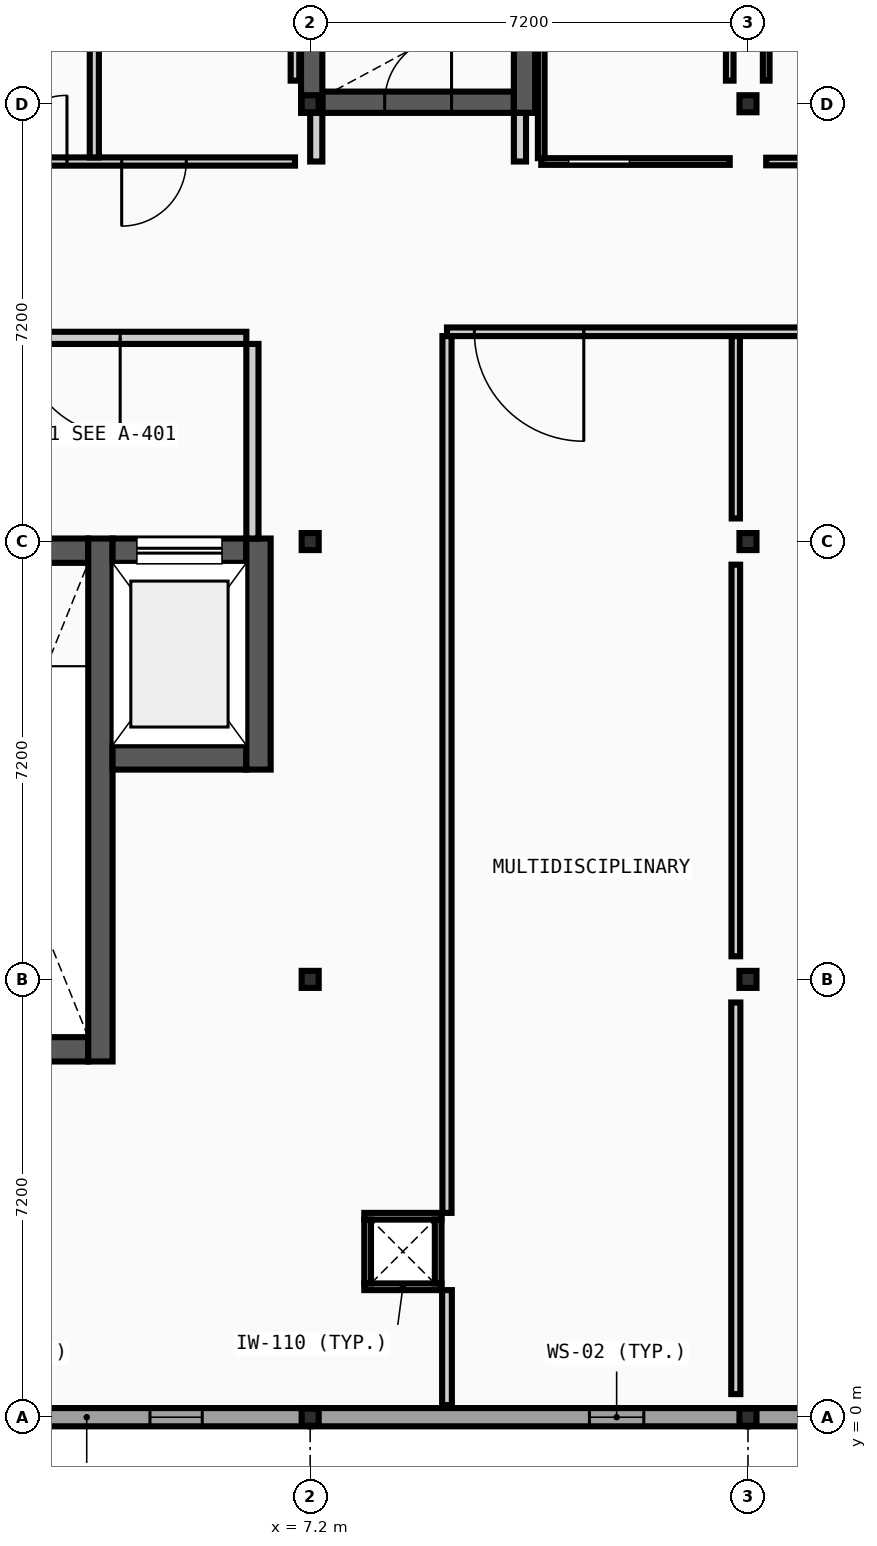
"""IFC4 building model, lengths in metres.
Left out: names, types, materials, properties, quantities, classifications, styles, units other than length and angle.
Written with IfcOpenShell. Run it as: python <this file> out.ifc"""

import sys

from ifc_helpers import new_model, si_unit, direction, frame, frame_2d, origin, origin_2d, place, context, subcontext, project, spatial, rectangle, i_section, extrude, element, fill, save


model = new_model("IFC4")
c1 = context("Model", 3, precision=1e-05, world=origin(), true_north=direction((0.0, 1.0)))
c2 = subcontext(c1, "Body", "Model", "MODEL_VIEW")
j1 = project(units=[si_unit("LENGTHUNIT", "METRE"), si_unit("PLANEANGLEUNIT", "RADIAN")], contexts=[c1])
p1 = place(None, origin())
s1 = spatial("IfcSite", under=j1, at=p1, CompositionType="ELEMENT")
p2 = place(p1, origin())
s2 = spatial("IfcBuilding", under=s1, at=p2, CompositionType="ELEMENT")
p3 = place(p2, frame((0.0, 0.0, 27.2)))
s3 = spatial("IfcBuildingStorey", under=s2, at=p3, CompositionType="ELEMENT", Elevation=27.2)
for number, where, z_axis, x_axis in (
    (1, (7.2, 0.0, 0.0), (0.0, 0.0, 1.0), (1.0, 0.0, 0.0)),
    (2, (7.2, 7.2, 0.0), (0.0, 0.0, 1.0), (1.0, 0.0, 0.0)),
    (3, (7.2, 14.4, 0.0), (0.0, 0.0, 1.0), (1.0, 0.0, 0.0)),
    (4, (7.2, 21.6, 0.0), (0.0, 0.0, 1.0), (1.0, 0.0, 0.0)),
    (5, (14.4, 0.0, 0.0), (0.0, 0.0, 1.0), (1.0, 0.0, 0.0)),
    (6, (14.4, 7.2, 0.0), (0.0, 0.0, 1.0), (1.0, 0.0, 0.0)),
    (7, (14.4, 14.4, 0.0), (0.0, 0.0, 1.0), (1.0, 0.0, 0.0)),
    (8, (14.4, 21.6, 0.0), (0.0, 0.0, 1.0), (1.0, 0.0, 0.0)),
):
    element("IfcColumn", number, at=place(p3, frame(where, z_axis=z_axis, x_axis=x_axis)), inside=s3, PredefinedType="COLUMN", context=c2, shape_type="SweptSolid", body=[
        extrude(i_section(OverallWidth=0.28, OverallDepth=0.28, WebThickness=0.01, FlangeThickness=0.018, FilletRadius=0.024, at=origin_2d()), origin(), (0.0, 0.0, 1.0), 4.4),
    ])
p4 = place(p3, frame((-0.15, 0.0, 0.0), z_axis=(0.0, 0.0, 1.0), x_axis=(1.0, 0.0, 0.0)))
e9 = element("IfcWall", 9, at=p4, inside=s3, PredefinedType="STANDARD", context=c2, shape_type="SweptSolid", body=[
    extrude(rectangle(XDim=7.35, YDim=0.3, at=frame_2d((3.675, 0.0))), origin(), (0.0, 0.0, 1.0), 4.035),
])
p5 = place(p4, frame((1.775, 0.0, 0.95)))
e10 = element("IfcOpeningElement", 10, at=p5, cuts=e9, PredefinedType="OPENING", context=c2, shape_type="SweptSolid", body=[
    extrude(rectangle(XDim=0.86, YDim=1.26, at=frame_2d((0.43, 0.63))), frame((0.0, 0.16, 0.0), z_axis=(0.0, -1.0, 0.0), x_axis=(1.0, 0.0, 0.0)), (0.0, 0.0, 1.0), 0.32),
])
p6 = place(p4, frame((4.715, 0.0, 0.95)))
e11 = element("IfcOpeningElement", 11, at=p6, cuts=e9, PredefinedType="OPENING", context=c2, shape_type="SweptSolid", body=[
    extrude(rectangle(XDim=0.86, YDim=1.26, at=frame_2d((0.43, 0.63))), frame((0.0, 0.16, 0.0), z_axis=(0.0, -1.0, 0.0), x_axis=(1.0, 0.0, 0.0)), (0.0, 0.0, 1.0), 0.32),
])
p7 = place(p3, frame((7.2, 0.0, 0.0), z_axis=(0.0, 0.0, 1.0), x_axis=(1.0, 0.0, 0.0)))
e12 = element("IfcWall", 12, at=p7, inside=s3, PredefinedType="STANDARD", context=c2, shape_type="SweptSolid", body=[
    extrude(rectangle(XDim=7.2, YDim=0.3, at=frame_2d((3.6, 0.0))), origin(), (0.0, 0.0, 1.0), 4.035),
])
p8 = place(p7, frame((4.593, 0.0, 0.95)))
e13 = element("IfcOpeningElement", 13, at=p8, cuts=e12, PredefinedType="OPENING", context=c2, shape_type="SweptSolid", body=[
    extrude(rectangle(XDim=0.894, YDim=1.26, at=frame_2d((0.447, 0.63))), frame((0.0, 0.16, 0.0), z_axis=(0.0, -1.0, 0.0), x_axis=(1.0, 0.0, 0.0)), (0.0, 0.0, 1.0), 0.32),
])
p9 = place(p3, frame((14.4, 0.0, 0.0), z_axis=(0.0, 0.0, 1.0), x_axis=(1.0, 0.0, 0.0)))
e14 = element("IfcWall", 14, at=p9, inside=s3, PredefinedType="STANDARD", context=c2, shape_type="SweptSolid", body=[
    extrude(rectangle(XDim=7.2, YDim=0.3, at=frame_2d((3.6, 0.0))), origin(), (0.0, 0.0, 1.0), 4.035),
])
p10 = place(p9, frame((1.696, 0.0, 0.95)))
e15 = element("IfcOpeningElement", 15, at=p10, cuts=e14, PredefinedType="OPENING", context=c2, shape_type="SweptSolid", body=[
    extrude(rectangle(XDim=0.928, YDim=1.26, at=frame_2d((0.464, 0.63))), frame((0.0, 0.16, 0.0), z_axis=(0.0, -1.0, 0.0), x_axis=(1.0, 0.0, 0.0)), (0.0, 0.0, 1.0), 0.32),
])
p11 = place(p9, frame((4.576, 0.0, 0.95)))
e16 = element("IfcOpeningElement", 16, at=p11, cuts=e14, PredefinedType="OPENING", context=c2, shape_type="SweptSolid", body=[
    extrude(rectangle(XDim=0.928, YDim=1.26, at=frame_2d((0.464, 0.63))), frame((0.0, 0.16, 0.0), z_axis=(0.0, -1.0, 0.0), x_axis=(1.0, 0.0, 0.0)), (0.0, 0.0, 1.0), 0.32),
])
p12 = place(p3, frame((0.4, 6.05, 0.0), z_axis=(0.0, 0.0, 1.0), x_axis=(1.0, 0.0, 0.0)))
e17 = element("IfcWall", 17, at=p12, inside=s3, PredefinedType="SHEAR", context=c2, shape_type="SweptSolid", body=[
    extrude(rectangle(XDim=3.15, YDim=0.4, at=frame_2d((1.575, 0.0))), origin(), (0.0, 0.0, 1.0), 4.18),
])
p13 = place(p3, frame((0.4, 14.25, 0.0), z_axis=(0.0, 0.0, 1.0), x_axis=(1.0, 0.0, 0.0)))
e18 = element("IfcWall", 18, at=p13, inside=s3, PredefinedType="SHEAR", context=c2, shape_type="SweptSolid", body=[
    extrude(rectangle(XDim=3.15, YDim=0.4, at=frame_2d((1.575, 0.0))), origin(), (0.0, 0.0, 1.0), 4.18),
])
p14 = place(p13, frame((0.975, 0.0, 0.0)))
e19 = element("IfcOpeningElement", 19, at=p14, cuts=e18, PredefinedType="OPENING", context=c2, shape_type="SweptSolid", body=[
    extrude(rectangle(XDim=1.2, YDim=2.15, at=frame_2d((0.6, 1.075))), frame((0.0, 0.21, 0.0), z_axis=(0.0, -1.0, 0.0), x_axis=(1.0, 0.0, 0.0)), (0.0, 0.0, 1.0), 0.42),
])
p15 = place(p3, frame((3.75, 5.85, 0.0), z_axis=(0.0, 0.0, 1.0), x_axis=(0.0, 1.0, 0.0)))
e20 = element("IfcWall", 20, at=p15, inside=s3, PredefinedType="SHEAR", context=c2, shape_type="SweptSolid", body=[
    extrude(rectangle(XDim=8.6, YDim=0.4, at=frame_2d((4.3, 0.0))), origin(), (0.0, 0.0, 1.0), 4.18),
])
p16 = place(p3, frame((3.95, 10.85, 0.0), z_axis=(0.0, 0.0, 1.0), x_axis=(1.0, 0.0, 0.0)))
e21 = element("IfcWall", 21, at=p16, inside=s3, PredefinedType="SHEAR", context=c2, shape_type="SweptSolid", body=[
    extrude(rectangle(XDim=2.2, YDim=0.4, at=frame_2d((1.1, 0.0))), origin(), (0.0, 0.0, 1.0), 4.18),
])
p17 = place(p3, frame((3.95, 14.25, 0.0), z_axis=(0.0, 0.0, 1.0), x_axis=(1.0, 0.0, 0.0)))
e22 = element("IfcWall", 22, at=p17, inside=s3, PredefinedType="SHEAR", context=c2, shape_type="SweptSolid", body=[
    extrude(rectangle(XDim=2.2, YDim=0.4, at=frame_2d((1.1, 0.0))), origin(), (0.0, 0.0, 1.0), 4.18),
])
p18 = place(p17, frame((0.4, 0.0, 0.0)))
e23 = element("IfcOpeningElement", 23, at=p18, cuts=e22, PredefinedType="OPENING", context=c2, shape_type="SweptSolid", body=[
    extrude(rectangle(XDim=1.4, YDim=2.2, at=frame_2d((0.7, 1.1))), frame((0.0, 0.21, 0.0), z_axis=(0.0, -1.0, 0.0), x_axis=(1.0, 0.0, 0.0)), (0.0, 0.0, 1.0), 0.42),
])
p19 = place(p3, frame((6.35, 10.65, 0.0), z_axis=(0.0, 0.0, 1.0), x_axis=(0.0, 1.0, 0.0)))
e24 = element("IfcWall", 24, at=p19, inside=s3, PredefinedType="SHEAR", context=c2, shape_type="SweptSolid", body=[
    extrude(rectangle(XDim=3.8, YDim=0.4, at=frame_2d((1.9, 0.0))), origin(), (0.0, 0.0, 1.0), 4.18),
])
p20 = place(p3, frame((0.4, 17.75, 0.0), z_axis=(0.0, 0.0, 1.0), x_axis=(1.0, 0.0, 0.0)))
e25 = element("IfcWall", 25, at=p20, inside=s3, PredefinedType="PARTITIONING", context=c2, shape_type="SweptSolid", body=[
    extrude(rectangle(XDim=5.75, YDim=0.2, at=frame_2d((2.875, 0.0))), origin(), (0.0, 0.0, 1.0), 4.18),
])
p21 = place(p20, frame((2.075, 0.0, 0.0)))
e26 = element("IfcOpeningElement", 26, at=p21, cuts=e25, PredefinedType="OPENING", context=c2, shape_type="SweptSolid", body=[
    extrude(rectangle(XDim=1.6, YDim=2.2, at=frame_2d((0.8, 1.1))), frame((0.0, 0.11, 0.0), z_axis=(0.0, -1.0, 0.0), x_axis=(1.0, 0.0, 0.0)), (0.0, 0.0, 1.0), 0.22),
])
p22 = place(p3, frame((6.25, 14.45, 0.0), z_axis=(0.0, 0.0, 1.0), x_axis=(0.0, 1.0, 0.0)))
e27 = element("IfcWall", 27, at=p22, inside=s3, PredefinedType="PARTITIONING", context=c2, shape_type="SweptSolid", body=[
    extrude(rectangle(XDim=3.2, YDim=0.2, at=frame_2d((1.6, 0.0))), origin(), (0.0, 0.0, 1.0), 4.18),
])
p23 = place(p3, frame((7.4, 21.625, 0.0), z_axis=(0.0, 0.0, 1.0), x_axis=(1.0, 0.0, 0.0)))
e28 = element("IfcWall", 28, at=p23, inside=s3, PredefinedType="SHEAR", context=c2, shape_type="SweptSolid", body=[
    extrude(rectangle(XDim=3.15, YDim=0.35, at=frame_2d((1.575, 0.0))), origin(), (0.0, 0.0, 1.0), 4.2),
])
p24 = place(p23, frame((1.025, 0.0, 0.0)))
e29 = element("IfcOpeningElement", 29, at=p24, cuts=e28, PredefinedType="OPENING", context=c2, shape_type="SweptSolid", body=[
    extrude(rectangle(XDim=1.1, YDim=2.15, at=frame_2d((0.55, 1.075))), frame((0.0, 0.185, 0.0), z_axis=(0.0, -1.0, 0.0), x_axis=(1.0, 0.0, 0.0)), (0.0, 0.0, 1.0), 0.37),
])
for number, where, z_axis, x_axis in (
    (30, (7.225, 21.45, 0.0), (0.0, 0.0, 1.0), (0.0, 1.0, 0.0)),
    (31, (10.725, 21.45, 0.0), (0.0, 0.0, 1.0), (0.0, 1.0, 0.0)),
):
    element("IfcWall", number, at=place(p3, frame(where, z_axis=z_axis, x_axis=x_axis)), inside=s3, PredefinedType="SHEAR", context=c2, shape_type="SweptSolid", body=[
        extrude(rectangle(XDim=7.5, YDim=0.35, at=frame_2d((3.75, 0.0))), origin(), (0.0, 0.0, 1.0), 4.2),
    ])
for number, where, z_axis, x_axis in (
    (32, (7.3, 20.65, 0.0), (0.0, 0.0, 1.0), (0.0, 1.0, 0.0)),
    (33, (10.65, 20.65, 0.0), (0.0, 0.0, 1.0), (0.0, 1.0, 0.0)),
):
    element("IfcWall", number, at=place(p3, frame(where, z_axis=z_axis, x_axis=x_axis)), inside=s3, PredefinedType="PARTITIONING", context=c2, shape_type="SweptSolid", body=[
        extrude(rectangle(XDim=0.8, YDim=0.2, at=frame_2d((0.4, 0.0))), origin(), (0.0, 0.0, 1.0), 3.85),
    ])
for number, where, z_axis, x_axis in (
    (34, (8.09, 2.145, 0.0), (0.0, 0.0, 1.0), (1.0, 0.0, 0.0)),
    (35, (8.09, 3.305, 0.0), (0.0, 0.0, 1.0), (1.0, 0.0, 0.0)),
):
    element("IfcWall", number, at=place(p3, frame(where, z_axis=z_axis, x_axis=x_axis)), inside=s3, PredefinedType="PARTITIONING", context=c2, shape_type="SweptSolid", body=[
        extrude(rectangle(XDim=1.27, YDim=0.11, at=frame_2d((0.635, 0.0))), origin(), (0.0, 0.0, 1.0), 4.18),
    ])
for number, where, z_axis, x_axis in (
    (36, (8.145, 2.2, 0.0), (0.0, 0.0, 1.0), (0.0, 1.0, 0.0)),
    (37, (9.305, 2.2, 0.0), (0.0, 0.0, 1.0), (0.0, 1.0, 0.0)),
):
    element("IfcWall", number, at=place(p3, frame(where, z_axis=z_axis, x_axis=x_axis)), inside=s3, PredefinedType="PARTITIONING", context=c2, shape_type="SweptSolid", body=[
        extrude(rectangle(XDim=1.05, YDim=0.11, at=frame_2d((0.525, 0.0))), origin(), (0.0, 0.0, 1.0), 4.18),
    ])
p25 = place(p3, frame((9.45, 17.85, 0.0), z_axis=(0.0, 0.0, 1.0), x_axis=(1.0, 0.0, 0.0)))
e38 = element("IfcWall", 38, at=p25, inside=s3, PredefinedType="PARTITIONING", context=c2, shape_type="SweptSolid", body=[
    extrude(rectangle(XDim=12.75, YDim=0.142, at=frame_2d((6.375, 0.0))), origin(), (0.0, 0.0, 1.0), 4.18),
])
p26 = place(p25, frame((0.45, 0.0, 0.0)))
e39 = element("IfcOpeningElement", 39, at=p26, cuts=e38, PredefinedType="OPENING", context=c2, shape_type="SweptSolid", body=[
    extrude(rectangle(XDim=1.8, YDim=2.3, at=frame_2d((0.9, 1.15))), frame((0.0, 0.081, 0.0), z_axis=(0.0, -1.0, 0.0), x_axis=(1.0, 0.0, 0.0)), (0.0, 0.0, 1.0), 0.162),
])
p27 = place(p25, frame((8.18, 0.0, 0.0)))
e40 = element("IfcOpeningElement", 40, at=p27, cuts=e38, PredefinedType="OPENING", context=c2, shape_type="SweptSolid", body=[
    extrude(rectangle(XDim=1.14, YDim=2.096, at=frame_2d((0.57, 1.048))), frame((0.0, 0.081, 0.0), z_axis=(0.0, -1.0, 0.0), x_axis=(1.0, 0.0, 0.0)), (0.0, 0.0, 1.0), 0.162),
])
p28 = place(p3, frame((0.2, 20.65, 0.0), z_axis=(0.0, 0.0, 1.0), x_axis=(1.0, 0.0, 0.0)))
e41 = element("IfcWall", 41, at=p28, inside=s3, PredefinedType="PARTITIONING", context=c2, shape_type="SweptSolid", body=[
    extrude(rectangle(XDim=6.75, YDim=0.135, at=frame_2d((3.375, 0.0))), origin(), (0.0, 0.0, 1.0), 4.18),
])
p29 = place(p28, frame((3.9, 0.0, 0.0)))
e42 = element("IfcOpeningElement", 42, at=p29, cuts=e41, PredefinedType="OPENING", context=c2, shape_type="SweptSolid", body=[
    extrude(rectangle(XDim=1.062, YDim=2.096, at=frame_2d((0.531, 1.048))), frame((0.0, 0.078, 0.0), z_axis=(0.0, -1.0, 0.0), x_axis=(1.0, 0.0, 0.0)), (0.0, 0.0, 1.0), 0.155),
])
p30 = place(p28, frame((1.912, 0.0, 0.0)))
e43 = element("IfcOpeningElement", 43, at=p30, cuts=e41, PredefinedType="OPENING", context=c2, shape_type="SweptSolid", body=[
    extrude(rectangle(XDim=1.088, YDim=2.096, at=frame_2d((0.544, 1.048))), frame((0.0, 0.078, 0.0), z_axis=(0.0, -1.0, 0.0), x_axis=(1.0, 0.0, 0.0)), (0.0, 0.0, 1.0), 0.155),
])
p31 = place(p3, frame((11.0, 20.65, 0.0), z_axis=(0.0, 0.0, 1.0), x_axis=(1.0, 0.0, 0.0)))
e44 = element("IfcWall", 44, at=p31, inside=s3, PredefinedType="PARTITIONING", context=c2, shape_type="SweptSolid", body=[
    extrude(rectangle(XDim=3.1, YDim=0.11, at=frame_2d((1.55, 0.0))), origin(), (0.0, 0.0, 1.0), 4.18),
])
p32 = place(p31, frame((0.45, 0.0, 0.0)))
e45 = element("IfcOpeningElement", 45, at=p32, cuts=e44, PredefinedType="OPENING", context=c2, shape_type="SweptSolid", body=[
    extrude(rectangle(XDim=1.0, YDim=2.1, at=frame_2d((0.5, 1.05))), frame((0.0, 0.065, 0.0), z_axis=(0.0, -1.0, 0.0), x_axis=(1.0, 0.0, 0.0)), (0.0, 0.0, 1.0), 0.13),
])
p33 = place(p3, frame((14.7, 20.65, 0.0), z_axis=(0.0, 0.0, 1.0), x_axis=(1.0, 0.0, 0.0)))
e46 = element("IfcWall", 46, at=p33, inside=s3, PredefinedType="PARTITIONING", context=c2, shape_type="SweptSolid", body=[
    extrude(rectangle(XDim=3.1, YDim=0.125, at=frame_2d((1.55, 0.0))), origin(), (0.0, 0.0, 1.0), 4.18),
])
p34 = place(p33, frame((1.75, 0.0, 0.0)))
e47 = element("IfcOpeningElement", 47, at=p34, cuts=e46, PredefinedType="OPENING", context=c2, shape_type="SweptSolid", body=[
    extrude(rectangle(XDim=0.9, YDim=2.1, at=frame_2d((0.45, 1.05))), frame((0.0, 0.073, 0.0), z_axis=(0.0, -1.0, 0.0), x_axis=(1.0, 0.0, 0.0)), (0.0, 0.0, 1.0), 0.145),
])
p35 = place(p3, frame((3.65, 20.718, 0.0), z_axis=(0.0, 0.0, 1.0), x_axis=(0.0, 1.0, 0.0)))
e48 = element("IfcWall", 48, at=p35, inside=s3, PredefinedType="PARTITIONING", context=c2, shape_type="SweptSolid", body=[
    extrude(rectangle(XDim=15.083, YDim=0.15, at=frame_2d((7.541, 0.0))), origin(), (0.0, 0.0, 1.0), 4.18),
])
p36 = place(p3, frame((6.95, 21.98, 0.0), z_axis=(0.0, 0.0, 1.0), x_axis=(0.0, 1.0, 0.0)))
e49 = element("IfcWall", 49, at=p36, inside=s3, PredefinedType="PARTITIONING", context=c2, shape_type="SweptSolid", body=[
    extrude(rectangle(XDim=6.44, YDim=0.142, at=frame_2d((3.22, 0.0))), origin(), (0.0, 0.0, 1.0), 4.18),
])
p37 = place(p3, frame((9.45, 0.2, 0.0), z_axis=(0.0, 0.0, 1.0), x_axis=(0.0, 1.0, 0.0)))
e50 = element("IfcWall", 50, at=p37, inside=s3, PredefinedType="PARTITIONING", context=c2, shape_type="SweptSolid", body=[
    extrude(rectangle(XDim=1.89, YDim=0.16, at=frame_2d((0.945, 0.0))), origin(), (0.0, 0.0, 1.0), 4.18),
])
p38 = place(p3, frame((9.45, 3.36, 0.0), z_axis=(0.0, 0.0, 1.0), x_axis=(0.0, 1.0, 0.0)))
e51 = element("IfcWall", 51, at=p38, inside=s3, PredefinedType="PARTITIONING", context=c2, shape_type="SweptSolid", body=[
    extrude(rectangle(XDim=14.419, YDim=0.15, at=frame_2d((7.209, 0.0))), origin(), (0.0, 0.0, 1.0), 4.18),
])
p39 = place(p3, frame((11.0, 20.705, 0.0), z_axis=(0.0, 0.0, 1.0), x_axis=(0.0, 1.0, 0.0)))
e52 = element("IfcWall", 52, at=p39, inside=s3, PredefinedType="PARTITIONING", context=c2, shape_type="SweptSolid", body=[
    extrude(rectangle(XDim=15.032, YDim=0.11, at=frame_2d((7.516, 0.0))), origin(), (0.0, 0.0, 1.0), 4.18),
])
p40 = place(p3, frame((14.1, 21.98, 0.0), z_axis=(0.0, 0.0, 1.0), x_axis=(0.0, 1.0, 0.0)))
e53 = element("IfcWall", 53, at=p40, inside=s3, PredefinedType="PARTITIONING", context=c2, shape_type="SweptSolid", body=[
    extrude(rectangle(XDim=6.44, YDim=0.125, at=frame_2d((3.22, 0.0))), origin(), (0.0, 0.0, 1.0), 4.18),
])
p41 = place(p3, frame((14.2, 0.38, 0.0), z_axis=(0.0, 0.0, 1.0), x_axis=(0.0, 1.0, 0.0)))
e54 = element("IfcWall", 54, at=p41, inside=s3, PredefinedType="PARTITIONING", context=c2, shape_type="SweptSolid", body=[
    extrude(rectangle(XDim=6.44, YDim=0.15, at=frame_2d((3.22, 0.0))), origin(), (0.0, 0.0, 1.0), 4.18),
])
p42 = place(p3, frame((14.2, 7.58, 0.0), z_axis=(0.0, 0.0, 1.0), x_axis=(0.0, 1.0, 0.0)))
e55 = element("IfcWall", 55, at=p42, inside=s3, PredefinedType="PARTITIONING", context=c2, shape_type="SweptSolid", body=[
    extrude(rectangle(XDim=6.44, YDim=0.142, at=frame_2d((3.22, 0.0))), origin(), (0.0, 0.0, 1.0), 4.18),
])
p43 = place(p3, frame((14.2, 14.78, 0.0), z_axis=(0.0, 0.0, 1.0), x_axis=(0.0, 1.0, 0.0)))
e56 = element("IfcWall", 56, at=p43, inside=s3, PredefinedType="PARTITIONING", context=c2, shape_type="SweptSolid", body=[
    extrude(rectangle(XDim=2.999, YDim=0.135, at=frame_2d((1.5, 0.0))), origin(), (0.0, 0.0, 1.0), 4.18),
])
p44 = place(p3, frame((14.7, 21.98, 0.0), z_axis=(0.0, 0.0, 1.0), x_axis=(0.0, 1.0, 0.0)))
e57 = element("IfcWall", 57, at=p44, inside=s3, PredefinedType="PARTITIONING", context=c2, shape_type="SweptSolid", body=[
    extrude(rectangle(XDim=6.44, YDim=0.11, at=frame_2d((3.22, 0.0))), origin(), (0.0, 0.0, 1.0), 4.18),
])
p45 = place(p6, origin())
e58 = element("IfcWindow", 58, at=p45, inside=s3, PartitioningType="SINGLE_PANEL", PredefinedType="WINDOW", context=c2, shape_type="SweptSolid", body=[
    extrude(rectangle(XDim=0.86, YDim=1.26, at=frame_2d((0.43, 0.63))), frame((0.0, 0.03, 0.0), z_axis=(0.0, -1.0, 0.0), x_axis=(1.0, 0.0, 0.0)), (0.0, 0.0, 1.0), 0.06),
])
fill(e11, e58)
p46 = place(p8, origin())
e59 = element("IfcWindow", 59, at=p46, inside=s3, PartitioningType="SINGLE_PANEL", PredefinedType="WINDOW", context=c2, shape_type="SweptSolid", body=[
    extrude(rectangle(XDim=0.894, YDim=1.26, at=frame_2d((0.447, 0.63))), frame((0.0, 0.03, 0.0), z_axis=(0.0, -1.0, 0.0), x_axis=(1.0, 0.0, 0.0)), (0.0, 0.0, 1.0), 0.06),
])
fill(e13, e59)
p47 = place(p18, origin())
e60 = element("IfcDoor", 60, at=p47, inside=s3, OperationType="SLIDING_TO_LEFT", PredefinedType="DOOR", context=c2, shape_type="SweptSolid", body=[
    extrude(rectangle(XDim=1.4, YDim=2.2, at=frame_2d((0.7, 1.1))), frame((0.0, 0.025, 0.0), z_axis=(0.0, -1.0, 0.0), x_axis=(1.0, 0.0, 0.0)), (0.0, 0.0, 1.0), 0.05),
])
fill(e23, e60)
p48 = place(p21, origin())
e61 = element("IfcDoor", 61, at=p48, inside=s3, OperationType="DOUBLE_DOOR_SINGLE_SWING", PredefinedType="DOOR", context=c2, shape_type="SweptSolid", body=[
    extrude(rectangle(XDim=1.6, YDim=2.2, at=frame_2d((0.8, 1.1))), frame((0.0, 0.025, 0.0), z_axis=(0.0, -1.0, 0.0), x_axis=(1.0, 0.0, 0.0)), (0.0, 0.0, 1.0), 0.05),
])
fill(e26, e61)
p49 = place(p24, frame((1.1, 0.0, 0.0), z_axis=(0.0, 0.0, 1.0), x_axis=(-1.0, 0.0, 0.0)))
e62 = element("IfcDoor", 62, at=p49, inside=s3, OperationType="SINGLE_SWING_RIGHT", PredefinedType="DOOR", context=c2, shape_type="SweptSolid", body=[
    extrude(rectangle(XDim=1.1, YDim=2.15, at=frame_2d((0.55, 1.075))), frame((0.0, 0.025, 0.0), z_axis=(0.0, -1.0, 0.0), x_axis=(1.0, 0.0, 0.0)), (0.0, 0.0, 1.0), 0.05),
])
fill(e29, e62)
p50 = place(p32, frame((1.0, 0.0, 0.0), z_axis=(0.0, 0.0, 1.0), x_axis=(-1.0, 0.0, 0.0)))
e63 = element("IfcDoor", 63, at=p50, inside=s3, OperationType="SLIDING_TO_LEFT", PredefinedType="DOOR", context=c2, shape_type="SweptSolid", body=[
    extrude(rectangle(XDim=1.0, YDim=2.1, at=frame_2d((0.5, 1.05))), frame((0.0, 0.025, 0.0), z_axis=(0.0, -1.0, 0.0), x_axis=(1.0, 0.0, 0.0)), (0.0, 0.0, 1.0), 0.05),
])
fill(e45, e63)
p51 = place(p29, frame((1.062, 0.0, 0.0), z_axis=(0.0, 0.0, 1.0), x_axis=(-1.0, 0.0, 0.0)))
e64 = element("IfcDoor", 64, at=p51, inside=s3, OperationType="SINGLE_SWING_LEFT", PredefinedType="DOOR", context=c2, shape_type="SweptSolid", body=[
    extrude(rectangle(XDim=1.062, YDim=2.096, at=frame_2d((0.531, 1.048))), frame((0.0, 0.025, 0.0), z_axis=(0.0, -1.0, 0.0), x_axis=(1.0, 0.0, 0.0)), (0.0, 0.0, 1.0), 0.05),
])
fill(e42, e64)
p52 = place(p30, frame((1.088, 0.0, 0.0), z_axis=(0.0, 0.0, 1.0), x_axis=(-1.0, 0.0, 0.0)))
e65 = element("IfcDoor", 65, at=p52, inside=s3, OperationType="SINGLE_SWING_RIGHT", PredefinedType="DOOR", context=c2, shape_type="SweptSolid", body=[
    extrude(rectangle(XDim=1.088, YDim=2.096, at=frame_2d((0.544, 1.048))), frame((0.0, 0.025, 0.0), z_axis=(0.0, -1.0, 0.0), x_axis=(1.0, 0.0, 0.0)), (0.0, 0.0, 1.0), 0.05),
])
fill(e43, e65)
p53 = place(p26, origin())
e66 = element("IfcDoor", 66, at=p53, inside=s3, OperationType="DOUBLE_DOOR_SINGLE_SWING", PredefinedType="DOOR", context=c2, shape_type="SweptSolid", body=[
    extrude(rectangle(XDim=1.8, YDim=2.3, at=frame_2d((0.9, 1.15))), frame((0.0, 0.025, 0.0), z_axis=(0.0, -1.0, 0.0), x_axis=(1.0, 0.0, 0.0)), (0.0, 0.0, 1.0), 0.05),
])
fill(e39, e66)
save(model, sys.argv[1])
